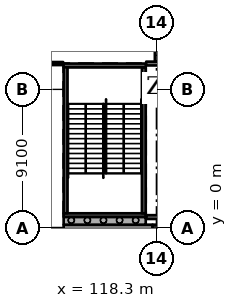
"""IFC4 building model, lengths in metres.
Left out: names, types, materials, properties, quantities, classifications, styles, units other than length and angle.
Written with IfcOpenShell. Run it as: python <this file> out.ifc"""

import sys

from ifc_helpers import new_model, si_unit, direction, frame, frame_2d, origin, origin_2d, place, context, subcontext, project, spatial, rectangle, extrude, element, fill, save


model = new_model("IFC4")
c1 = context("Model", 3, precision=1e-05, world=origin(), true_north=direction((0.0, 1.0)))
c2 = subcontext(c1, "Body", "Model", "MODEL_VIEW")
j1 = project(units=[si_unit("LENGTHUNIT", "METRE"), si_unit("PLANEANGLEUNIT", "RADIAN")], contexts=[c1])
p1 = place(None, origin())
s1 = spatial("IfcSite", under=j1, at=p1, CompositionType="ELEMENT")
p2 = place(p1, origin())
s2 = spatial("IfcBuilding", under=s1, at=p2, CompositionType="ELEMENT")
p3 = place(p2, frame((0.0, 0.0, 15.47)))
s3 = spatial("IfcBuildingStorey", under=s2, at=p3, CompositionType="ELEMENT", Elevation=15.47)
p4 = place(p3, frame((118.3, -0.05, 0.0), z_axis=(0.0, 0.0, 1.0), x_axis=(1.0, 0.0, 0.0)))
e1 = element("IfcColumn", 1, at=p4, inside=s3, PredefinedType="COLUMN", context=c2, shape_type="SweptSolid", body=[
    extrude(rectangle(XDim=0.5, YDim=0.5, at=origin_2d()), origin(), (0.0, 0.0, 1.0), 4.55),
])
p5 = place(p3, frame((118.3, 9.1, 0.0), z_axis=(0.0, 0.0, 1.0), x_axis=(1.0, 0.0, 0.0)))
e2 = element("IfcColumn", 2, at=p5, inside=s3, PredefinedType="COLUMN", context=c2, shape_type="SweptSolid", body=[
    extrude(rectangle(XDim=0.6, YDim=0.6, at=origin_2d()), origin(), (0.0, 0.0, 1.0), 4.55),
])
p6 = place(p3, frame((117.6, 0.825, 0.0), z_axis=(0.0, 0.0, 1.0), x_axis=(-1.0, 0.0, 0.0)))
e3 = element("IfcWall", 3, at=p6, inside=s3, PredefinedType="SHEAR", context=c2, shape_type="SweptSolid", body=[
    extrude(rectangle(XDim=5.4, YDim=0.25, at=frame_2d((2.7, 0.0))), origin(), (0.0, 0.0, 1.0), 4.55),
])
p7 = place(p3, frame((117.6, 10.675, 0.0), z_axis=(0.0, 0.0, 1.0), x_axis=(-1.0, 0.0, 0.0)))
e4 = element("IfcWall", 4, at=p7, inside=s3, PredefinedType="SHEAR", context=c2, shape_type="SweptSolid", body=[
    extrude(rectangle(XDim=5.4, YDim=0.25, at=frame_2d((2.7, 0.0))), origin(), (0.0, 0.0, 1.0), 4.55),
])
p8 = place(p7, frame((1.5, 0.0, 0.0)))
e5 = element("IfcOpeningElement", 5, at=p8, cuts=e4, PredefinedType="OPENING", context=c2, shape_type="SweptSolid", body=[
    extrude(rectangle(XDim=2.4, YDim=2.1, at=frame_2d((1.2, 1.05))), frame((0.0, 0.135, 0.0), z_axis=(0.0, -1.0, 0.0), x_axis=(1.0, 0.0, 0.0)), (0.0, 0.0, 1.0), 0.27),
])
for number, where, z_axis, x_axis in (
    (6, (112.325, 10.55, 0.0), (0.0, 0.0, 1.0), (0.0, -1.0, 0.0)),
    (7, (117.475, 10.55, 0.0), (0.0, 0.0, 1.0), (0.0, -1.0, 0.0)),
):
    element("IfcWall", number, at=place(p3, frame(where, z_axis=z_axis, x_axis=x_axis)), inside=s3, PredefinedType="SHEAR", context=c2, shape_type="SweptSolid", body=[
        extrude(rectangle(XDim=9.6, YDim=0.25, at=frame_2d((4.8, 0.0))), origin(), (0.0, 0.0, 1.0), 4.55),
    ])
p9 = place(p3, frame((112.2, 0.025, 0.0), z_axis=(0.0, 0.0, 1.0), x_axis=(1.0, 0.0, 0.0)))
e8 = element("IfcWall", 8, at=p9, inside=s3, PredefinedType="SOLIDWALL", context=c2, shape_type="SweptSolid", body=[
    extrude(rectangle(XDim=5.85, YDim=0.35, at=frame_2d((2.925, 0.0))), origin(), (0.0, 0.0, 1.0), 3.55),
])
p10 = place(p3, frame((112.2, 0.45, 0.0), z_axis=(0.0, 0.0, 1.0), x_axis=(1.0, 0.0, 0.0)))
e9 = element("IfcWall", 9, at=p10, inside=s3, PredefinedType="SOLIDWALL", context=c2, shape_type="SweptSolid", body=[
    extrude(rectangle(XDim=5.4, YDim=0.5, at=frame_2d((2.7, 0.0))), origin(), (0.0, 0.0, 1.0), 4.3),
])
p11 = place(p3, frame((112.17, 10.8, 0.0), z_axis=(0.0, 0.0, 1.0), x_axis=(-1.0, 0.0, 0.0)))
e10 = element("IfcWall", 10, at=p11, inside=s3, PredefinedType="PARTITIONING", context=c2, shape_type="SweptSolid", body=[
    extrude(rectangle(XDim=2.745, YDim=0.2, at=frame_2d((1.373, 0.0))), origin(), (0.0, 0.0, 1.0), 4.3),
])
p12 = place(p11, frame((0.45, 0.0, 0.0)))
e11 = element("IfcOpeningElement", 11, at=p12, cuts=e10, PredefinedType="OPENING", context=c2, shape_type="SweptSolid", body=[
    extrude(rectangle(XDim=1.8, YDim=2.4, at=frame_2d((0.9, 1.2))), frame((0.0, 0.11, 0.0), z_axis=(0.0, -1.0, 0.0), x_axis=(1.0, 0.0, 0.0)), (0.0, 0.0, 1.0), 0.22),
])
for number, where, z_axis, x_axis in (
    (12, (117.63, 8.8, 0.0), (0.0, 0.0, 1.0), (1.0, 0.0, 0.0)),
    (13, (118.0, 9.4, 0.0), (0.0, 0.0, 1.0), (-1.0, 0.0, 0.0)),
):
    element("IfcWall", number, at=place(p3, frame(where, z_axis=z_axis, x_axis=x_axis)), inside=s3, PredefinedType="SOLIDWALL", context=c2, shape_type="SweptSolid", body=[
        extrude(rectangle(XDim=0.37, YDim=0.25, at=frame_2d((0.185, 0.0))), origin(), (0.0, 0.0, 1.0), 4.3),
    ])
p13 = place(p3, frame((117.63, 10.8, 0.0), z_axis=(0.0, 0.0, 1.0), x_axis=(1.0, 0.0, 0.0)))
e14 = element("IfcWall", 14, at=p13, inside=s3, PredefinedType="SOLIDWALL", context=c2, shape_type="SweptSolid", body=[
    extrude(rectangle(XDim=3.64, YDim=0.25, at=frame_2d((1.82, 0.0))), origin(), (0.0, 0.0, 1.0), 4.3),
])
p14 = place(p13, frame((1.69, 0.0, 0.0)))
e15 = element("IfcOpeningElement", 15, at=p14, cuts=e14, PredefinedType="OPENING", context=c2, shape_type="SweptSolid", body=[
    extrude(rectangle(XDim=1.0, YDim=2.1, at=frame_2d((0.5, 1.05))), frame((0.0, 0.135, 0.0), z_axis=(0.0, -1.0, 0.0), x_axis=(1.0, 0.0, 0.0)), (0.0, 0.0, 1.0), 0.27),
])
p15 = place(p3, frame((118.3, 10.925, 0.0), z_axis=(0.0, 0.0, 1.0), x_axis=(0.0, 1.0, 0.0)))
e16 = element("IfcWall", 16, at=p15, inside=s3, PredefinedType="PARTITIONING", context=c2, shape_type="SweptSolid", body=[
    extrude(rectangle(XDim=6.925, YDim=0.2, at=frame_2d((3.462, 0.0))), origin(), (0.0, 0.0, 1.0), 3.55),
])
p16 = place(p15, frame((0.85, 0.0, 0.0)))
e17 = element("IfcOpeningElement", 17, at=p16, cuts=e16, PredefinedType="OPENING", context=c2, shape_type="SweptSolid", body=[
    extrude(rectangle(XDim=1.8, YDim=2.4, at=frame_2d((0.9, 1.2))), frame((0.0, 0.11, 0.0), z_axis=(0.0, -1.0, 0.0), x_axis=(1.0, 0.0, 0.0)), (0.0, 0.0, 1.0), 0.22),
])
p17 = place(p15, frame((4.25, 0.0, 0.0)))
e18 = element("IfcOpeningElement", 18, at=p17, cuts=e16, PredefinedType="OPENING", context=c2, shape_type="SweptSolid", body=[
    extrude(rectangle(XDim=1.8, YDim=2.4, at=frame_2d((0.9, 1.2))), frame((0.0, 0.11, 0.0), z_axis=(0.0, -1.0, 0.0), x_axis=(1.0, 0.0, 0.0)), (0.0, 0.0, 1.0), 0.22),
])
p18 = place(p3, frame((121.27, 0.7, 0.0), z_axis=(0.0, 0.0, 1.0), x_axis=(-1.0, 0.0, 0.0)))
e19 = element("IfcWall", 19, at=p18, inside=s3, PredefinedType="SOLIDWALL", context=c2, shape_type="SweptSolid", body=[
    extrude(rectangle(XDim=3.64, YDim=0.25, at=frame_2d((1.82, 0.0))), origin(), (0.0, 0.0, 1.0), 4.3),
])
p19 = place(p12, origin())
e20 = element("IfcDoor", 20, at=p19, inside=s3, OperationType="DOUBLE_DOOR_SINGLE_SWING", PredefinedType="DOOR", context=c2, shape_type="SweptSolid", body=[
    extrude(rectangle(XDim=1.8, YDim=2.4, at=frame_2d((0.9, 1.2))), frame((0.0, 0.025, 0.0), z_axis=(0.0, -1.0, 0.0), x_axis=(1.0, 0.0, 0.0)), (0.0, 0.0, 1.0), 0.05),
])
fill(e11, e20)
p20 = place(p8, origin())
e21 = element("IfcDoor", 21, at=p20, inside=s3, OperationType="DOUBLE_DOOR_SINGLE_SWING", PredefinedType="DOOR", context=c2, shape_type="SweptSolid", body=[
    extrude(rectangle(XDim=2.4, YDim=2.1, at=frame_2d((1.2, 1.05))), frame((0.0, 0.025, 0.0), z_axis=(0.0, -1.0, 0.0), x_axis=(1.0, 0.0, 0.0)), (0.0, 0.0, 1.0), 0.05),
])
fill(e5, e21)
save(model, sys.argv[1])
